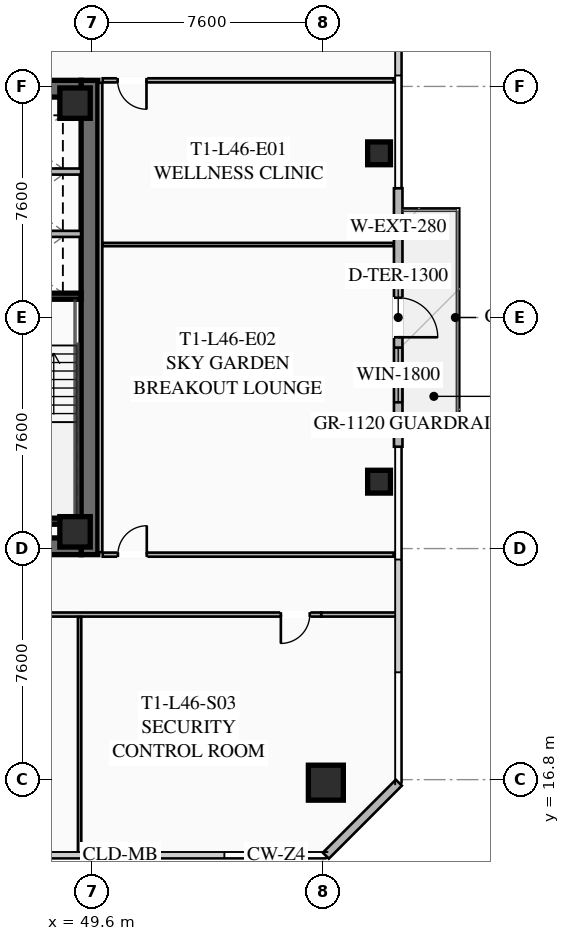
"""IFC4 building model, lengths in metres.
Left out: names, types, materials, properties, quantities, classifications, styles, units other than length and angle.
Written with IfcOpenShell. Run it as: python <this file> out.ifc"""

import sys

from ifc_helpers import new_model, si_unit, direction, frame, frame_2d, origin, origin_2d, place, context, subcontext, project, spatial, rectangle, hollow_rectangle, extrude, element, fill, save


model = new_model("IFC4")
c1 = context("Model", 3, precision=1e-05, world=origin(), true_north=direction((0.0, 1.0)))
c2 = subcontext(c1, "Body", "Model", "MODEL_VIEW")
j1 = project(units=[si_unit("LENGTHUNIT", "METRE"), si_unit("PLANEANGLEUNIT", "RADIAN")], contexts=[c1])
p1 = place(None, origin())
s1 = spatial("IfcSite", under=j1, at=p1, CompositionType="ELEMENT")
p2 = place(p1, origin())
s2 = spatial("IfcBuilding", under=s1, at=p2, CompositionType="ELEMENT")
p3 = place(p2, frame((0.0, 0.0, 171.2)))
s3 = spatial("IfcBuildingStorey", under=s2, at=p3, CompositionType="ELEMENT", Elevation=171.2)
p4 = place(p3, frame((49.525, 39.8, 0.0), z_axis=(0.0, 0.0, 1.0), x_axis=(0.0, -1.0, 0.0)))
e1 = element("IfcWall", 1, at=p4, inside=s3, PredefinedType="SHEAR", context=c2, shape_type="SweptSolid", body=[
    extrude(rectangle(XDim=15.6, YDim=0.55, at=frame_2d((7.8, 0.0))), origin(), (0.0, 0.0, 1.0), 3.55),
])
p5 = place(p3, frame((49.25, 24.475, 0.0), z_axis=(0.0, 0.0, 1.0), x_axis=(-1.0, 0.0, 0.0)))
e2 = element("IfcWall", 2, at=p5, inside=s3, PredefinedType="SHEAR", context=c2, shape_type="SweptSolid", body=[
    extrude(rectangle(XDim=14.5, YDim=0.55, at=frame_2d((7.25, 0.0))), origin(), (0.0, 0.0, 1.0), 3.55),
])
p6 = place(p5, frame((8.95, 0.0, 0.0)))
e3 = element("IfcOpeningElement", 3, at=p6, cuts=e2, PredefinedType="OPENING", context=c2, shape_type="SweptSolid", body=[
    extrude(rectangle(XDim=1.25, YDim=2.25, at=frame_2d((0.625, 1.125))), frame((0.0, 0.285, 0.0), z_axis=(0.0, -1.0, 0.0), x_axis=(1.0, 0.0, 0.0)), (0.0, 0.0, 1.0), 0.57),
])
p7 = place(p5, frame((3.9, 0.0, 0.0)))
e4 = element("IfcOpeningElement", 4, at=p7, cuts=e2, PredefinedType="OPENING", context=c2, shape_type="SweptSolid", body=[
    extrude(rectangle(XDim=1.25, YDim=2.25, at=frame_2d((0.625, 1.125))), frame((0.0, 0.285, 0.0), z_axis=(0.0, -1.0, 0.0), x_axis=(1.0, 0.0, 0.0)), (0.0, 0.0, 1.0), 0.57),
])
p8 = place(p3, frame((34.75, 39.525, 0.0), z_axis=(0.0, 0.0, 1.0), x_axis=(1.0, 0.0, 0.0)))
e5 = element("IfcWall", 5, at=p8, inside=s3, PredefinedType="SHEAR", context=c2, shape_type="SweptSolid", body=[
    extrude(rectangle(XDim=14.5, YDim=0.55, at=frame_2d((7.25, 0.0))), origin(), (0.0, 0.0, 1.0), 3.55),
])
p9 = place(p8, frame((4.3, 0.0, 0.0)))
e6 = element("IfcOpeningElement", 6, at=p9, cuts=e5, PredefinedType="OPENING", context=c2, shape_type="SweptSolid", body=[
    extrude(rectangle(XDim=1.25, YDim=2.25, at=frame_2d((0.625, 1.125))), frame((0.0, 0.285, 0.0), z_axis=(0.0, -1.0, 0.0), x_axis=(1.0, 0.0, 0.0)), (0.0, 0.0, 1.0), 0.57),
])
p10 = place(p8, frame((9.35, 0.0, 0.0)))
e7 = element("IfcOpeningElement", 7, at=p10, cuts=e5, PredefinedType="OPENING", context=c2, shape_type="SweptSolid", body=[
    extrude(rectangle(XDim=1.25, YDim=2.25, at=frame_2d((0.625, 1.125))), frame((0.0, 0.285, 0.0), z_axis=(0.0, -1.0, 0.0), x_axis=(1.0, 0.0, 0.0)), (0.0, 0.0, 1.0), 0.57),
])
for number, where, z_axis, x_axis in (
    (8, (49.05, 24.95, 0.0), (0.0, 0.0, 1.0), (1.0, 0.0, 0.0)),
    (9, (49.05, 39.05, 0.0), (0.0, 0.0, 1.0), (1.0, 0.0, 0.0)),
):
    element("IfcColumn", number, at=place(p3, frame(where, z_axis=z_axis, x_axis=x_axis)), inside=s3, PredefinedType="COLUMN", context=c2, shape_type="SweptSolid", body=[
        extrude(hollow_rectangle(XDim=1.0, YDim=1.0, WallThickness=0.04, at=origin_2d()), origin(), (0.0, 0.0, 1.0), 3.37),
    ])
p11 = place(p3, frame((57.3, 16.7, 0.0), z_axis=(0.0, 0.0, 1.0), x_axis=(1.0, 0.0, 0.0)))
e10 = element("IfcColumn", 10, at=p11, inside=s3, PredefinedType="COLUMN", context=c2, shape_type="SweptSolid", body=[
    extrude(hollow_rectangle(XDim=1.15, YDim=1.15, WallThickness=0.045, at=origin_2d()), origin(), (0.0, 0.0, 1.0), 3.37),
])
for number, where, z_axis, x_axis in (
    (11, (59.05, 26.6, 0.0), (0.0, 0.0, 1.0), (1.0, 0.0, 0.0)),
    (12, (59.05, 37.4, 0.0), (0.0, 0.0, 1.0), (1.0, 0.0, 0.0)),
):
    element("IfcColumn", number, at=place(p3, frame(where, z_axis=z_axis, x_axis=x_axis)), inside=s3, PredefinedType="COLUMN", context=c2, shape_type="SweptSolid", body=[
        extrude(hollow_rectangle(XDim=0.75, YDim=0.75, WallThickness=0.032, at=origin_2d()), origin(), (0.0, 0.0, 1.0), 3.37),
    ])
p12 = place(p3, frame((59.68, 36.25, 0.0), z_axis=(0.0, 0.0, 1.0), x_axis=(0.0, -1.0, 0.0)))
e13 = element("IfcWall", 13, at=p12, inside=s3, PredefinedType="SOLIDWALL", context=c2, shape_type="SweptSolid", body=[
    extrude(rectangle(XDim=8.5, YDim=0.28, at=frame_2d((4.25, 0.0))), origin(), (0.0, 0.0, 1.0), 3.37),
])
p13 = place(p12, frame((3.6, 0.0, 0.0)))
e14 = element("IfcOpeningElement", 14, at=p13, cuts=e13, PredefinedType="OPENING", context=c2, shape_type="SweptSolid", body=[
    extrude(rectangle(XDim=1.3, YDim=2.15, at=frame_2d((0.65, 1.075))), frame((0.0, 0.15, 0.0), z_axis=(0.0, -1.0, 0.0), x_axis=(1.0, 0.0, 0.0)), (0.0, 0.0, 1.0), 0.3),
])
p14 = place(p12, frame((5.24, 0.0, 0.85)))
e15 = element("IfcOpeningElement", 15, at=p14, cuts=e13, PredefinedType="OPENING", context=c2, shape_type="SweptSolid", body=[
    extrude(rectangle(XDim=1.8, YDim=1.92, at=frame_2d((0.9, 0.96))), frame((0.0, 0.15, 0.0), z_axis=(0.0, -1.0, 0.0), x_axis=(1.0, 0.0, 0.0)), (0.0, 0.0, 1.0), 0.3),
])
p15 = place(p3, frame((59.7, 16.7, 0.0), z_axis=(0.0, 0.0, 1.0), x_axis=(-0.707106781187, -0.707106781187, 0.0)))
e16 = element("IfcWall", 16, at=p15, inside=s3, PredefinedType="SOLIDWALL", context=c2, shape_type="SweptSolid", body=[
    extrude(rectangle(XDim=3.394, YDim=0.28, at=frame_2d((1.697, 0.0))), origin(), (0.0, 0.0, 1.0), 3.37),
])
for number, where, z_axis, x_axis in (
    (17, (45.7, 32.7, 0.0), (0.0, 0.0, 1.0), (1.0, 0.0, 0.0)),
    (18, (45.7, 25.3, 0.0), (0.0, 0.0, 1.0), (1.0, 0.0, 0.0)),
):
    element("IfcWall", number, at=place(p3, frame(where, z_axis=z_axis, x_axis=x_axis)), inside=s3, PredefinedType="SHEAR", context=c2, shape_type="SweptSolid", body=[
        extrude(rectangle(XDim=3.55, YDim=0.2, at=frame_2d((1.775, 0.0))), origin(), (0.0, 0.0, 1.0), 3.37),
    ])
for number, where, z_axis, x_axis in (
    (19, (46.05, 34.75, 0.0), (0.0, 0.0, 1.0), (1.0, 0.0, 0.0)),
    (20, (46.05, 36.8, 0.0), (0.0, 0.0, 1.0), (1.0, 0.0, 0.0)),
):
    element("IfcWall", number, at=place(p3, frame(where, z_axis=z_axis, x_axis=x_axis)), inside=s3, PredefinedType="SOLIDWALL", context=c2, shape_type="SweptSolid", body=[
        extrude(rectangle(XDim=3.2, YDim=0.2, at=frame_2d((1.6, 0.0))), origin(), (0.0, 0.0, 1.0), 3.37),
    ])
p16 = place(p3, frame((57.15, 22.23, 0.0), z_axis=(0.0, 0.0, 1.0), x_axis=(-1.0, 0.0, 0.0)))
e21 = element("IfcWall", 21, at=p16, inside=s3, PredefinedType="PARTITIONING", context=c2, shape_type="SweptSolid", body=[
    extrude(rectangle(XDim=30.3, YDim=0.135, at=frame_2d((15.15, 0.0))), origin(), (0.0, 0.0, 1.0), 2.723),
])
p17 = place(p16, frame((28.97, 0.0, 0.0)))
e22 = element("IfcOpeningElement", 22, at=p17, cuts=e21, PredefinedType="OPENING", context=c2, shape_type="SweptSolid", body=[
    extrude(rectangle(XDim=0.95, YDim=2.05, at=frame_2d((0.475, 1.025))), frame((0.0, 0.077, 0.0), z_axis=(0.0, -1.0, 0.0), x_axis=(1.0, 0.0, 0.0)), (0.0, 0.0, 1.0), 0.155),
])
p18 = place(p16, frame((14.438, 0.0, 0.0)))
e23 = element("IfcOpeningElement", 23, at=p18, cuts=e21, PredefinedType="OPENING", context=c2, shape_type="SweptSolid", body=[
    extrude(rectangle(XDim=0.95, YDim=2.05, at=frame_2d((0.475, 1.025))), frame((0.0, 0.077, 0.0), z_axis=(0.0, -1.0, 0.0), x_axis=(1.0, 0.0, 0.0)), (0.0, 0.0, 1.0), 0.155),
])
p19 = place(p16, frame((0.38, 0.0, 0.0)))
e24 = element("IfcOpeningElement", 24, at=p19, cuts=e21, PredefinedType="OPENING", context=c2, shape_type="SweptSolid", body=[
    extrude(rectangle(XDim=0.95, YDim=2.05, at=frame_2d((0.475, 1.025))), frame((0.0, 0.077, 0.0), z_axis=(0.0, -1.0, 0.0), x_axis=(1.0, 0.0, 0.0)), (0.0, 0.0, 1.0), 0.155),
])
p20 = place(p3, frame((57.15, 22.23, 0.0), z_axis=(0.0, 0.0, 1.0), x_axis=(1.0, 0.0, 0.0)))
e25 = element("IfcWall", 25, at=p20, inside=s3, PredefinedType="PARTITIONING", context=c2, shape_type="SweptSolid", body=[
    extrude(rectangle(XDim=2.53, YDim=0.135, at=frame_2d((1.265, 0.0))), origin(), (0.0, 0.0, 1.0), 2.723),
])
p21 = place(p3, frame((49.2, 14.32, 0.0), z_axis=(0.0, 0.0, 1.0), x_axis=(0.0, 1.0, 0.0)))
e26 = element("IfcWall", 26, at=p21, inside=s3, PredefinedType="PARTITIONING", context=c2, shape_type="SweptSolid", body=[
    extrude(rectangle(XDim=7.83, YDim=0.11, at=frame_2d((3.915, 0.0))), origin(), (0.0, 0.0, 1.0), 2.723),
])
p22 = place(p3, frame((49.88, 39.72, 0.0), z_axis=(0.0, 0.0, 1.0), x_axis=(0.0, -1.0, 0.0)))
e27 = element("IfcWall", 27, at=p22, inside=s3, PredefinedType="PARTITIONING", context=c2, shape_type="SweptSolid", body=[
    extrude(rectangle(XDim=15.44, YDim=0.135, at=frame_2d((7.72, 0.0))), origin(), (0.0, 0.0, 1.0), 2.723),
])
p23 = place(p3, frame((59.53, 39.8, 0.0), z_axis=(0.0, 0.0, 1.0), x_axis=(-1.0, 0.0, 0.0)))
e28 = element("IfcWall", 28, at=p23, inside=s3, PredefinedType="PARTITIONING", context=c2, shape_type="SweptSolid", body=[
    extrude(rectangle(XDim=9.57, YDim=0.135, at=frame_2d((4.785, 0.0))), origin(), (0.0, 0.0, 1.0), 2.723),
])
p24 = place(p23, frame((8.13, 0.0, 0.0)))
e29 = element("IfcOpeningElement", 29, at=p24, cuts=e28, PredefinedType="OPENING", context=c2, shape_type="SweptSolid", body=[
    extrude(rectangle(XDim=0.95, YDim=2.05, at=frame_2d((0.475, 1.025))), frame((0.0, 0.077, 0.0), z_axis=(0.0, -1.0, 0.0), x_axis=(1.0, 0.0, 0.0)), (0.0, 0.0, 1.0), 0.155),
])
p25 = place(p3, frame((49.96, 24.2, 0.0), z_axis=(0.0, 0.0, 1.0), x_axis=(1.0, 0.0, 0.0)))
e30 = element("IfcWall", 30, at=p25, inside=s3, PredefinedType="PARTITIONING", context=c2, shape_type="SweptSolid", body=[
    extrude(rectangle(XDim=9.57, YDim=0.135, at=frame_2d((4.785, 0.0))), origin(), (0.0, 0.0, 1.0), 2.723),
])
p26 = place(p25, frame((0.5, 0.0, 0.0)))
e31 = element("IfcOpeningElement", 31, at=p26, cuts=e30, PredefinedType="OPENING", context=c2, shape_type="SweptSolid", body=[
    extrude(rectangle(XDim=0.95, YDim=2.05, at=frame_2d((0.475, 1.025))), frame((0.0, 0.077, 0.0), z_axis=(0.0, -1.0, 0.0), x_axis=(1.0, 0.0, 0.0)), (0.0, 0.0, 1.0), 0.155),
])
p27 = place(p3, frame((49.96, 34.4, 0.0), z_axis=(0.0, 0.0, 1.0), x_axis=(1.0, 0.0, 0.0)))
e32 = element("IfcWall", 32, at=p27, inside=s3, PredefinedType="PARTITIONING", context=c2, shape_type="SweptSolid", body=[
    extrude(rectangle(XDim=9.57, YDim=0.11, at=frame_2d((4.785, 0.0))), origin(), (0.0, 0.0, 1.0), 2.723),
])
p28 = place(p13, origin())
e33 = element("IfcDoor", 33, at=p28, inside=s3, OperationType="SINGLE_SWING_RIGHT", PredefinedType="DOOR", context=c2, shape_type="SweptSolid", body=[
    extrude(rectangle(XDim=1.3, YDim=2.15, at=frame_2d((0.65, 1.075))), frame((0.0, 0.025, 0.0), z_axis=(0.0, -1.0, 0.0), x_axis=(1.0, 0.0, 0.0)), (0.0, 0.0, 1.0), 0.05),
])
fill(e14, e33)
p29 = place(p14, origin())
e34 = element("IfcWindow", 34, at=p29, inside=s3, PartitioningType="SINGLE_PANEL", PredefinedType="WINDOW", context=c2, shape_type="SweptSolid", body=[
    extrude(rectangle(XDim=1.8, YDim=1.92, at=frame_2d((0.9, 0.96))), frame((0.0, 0.03, 0.0), z_axis=(0.0, -1.0, 0.0), x_axis=(1.0, 0.0, 0.0)), (0.0, 0.0, 1.0), 0.06),
])
fill(e15, e34)
p30 = place(p19, origin())
e35 = element("IfcDoor", 35, at=p30, inside=s3, OperationType="SINGLE_SWING_RIGHT", PredefinedType="DOOR", context=c2, shape_type="SweptSolid", body=[
    extrude(rectangle(XDim=0.95, YDim=2.05, at=frame_2d((0.475, 1.025))), frame((0.0, 0.025, 0.0), z_axis=(0.0, -1.0, 0.0), x_axis=(1.0, 0.0, 0.0)), (0.0, 0.0, 1.0), 0.05),
])
fill(e24, e35)
p31 = place(p24, origin())
e36 = element("IfcDoor", 36, at=p31, inside=s3, OperationType="SINGLE_SWING_LEFT", PredefinedType="DOOR", context=c2, shape_type="SweptSolid", body=[
    extrude(rectangle(XDim=0.95, YDim=2.05, at=frame_2d((0.475, 1.025))), frame((0.0, 0.025, 0.0), z_axis=(0.0, -1.0, 0.0), x_axis=(1.0, 0.0, 0.0)), (0.0, 0.0, 1.0), 0.05),
])
fill(e29, e36)
p32 = place(p26, origin())
e37 = element("IfcDoor", 37, at=p32, inside=s3, OperationType="SINGLE_SWING_RIGHT", PredefinedType="DOOR", context=c2, shape_type="SweptSolid", body=[
    extrude(rectangle(XDim=0.95, YDim=2.05, at=frame_2d((0.475, 1.025))), frame((0.0, 0.025, 0.0), z_axis=(0.0, -1.0, 0.0), x_axis=(1.0, 0.0, 0.0)), (0.0, 0.0, 1.0), 0.05),
])
fill(e31, e37)
save(model, sys.argv[1])
